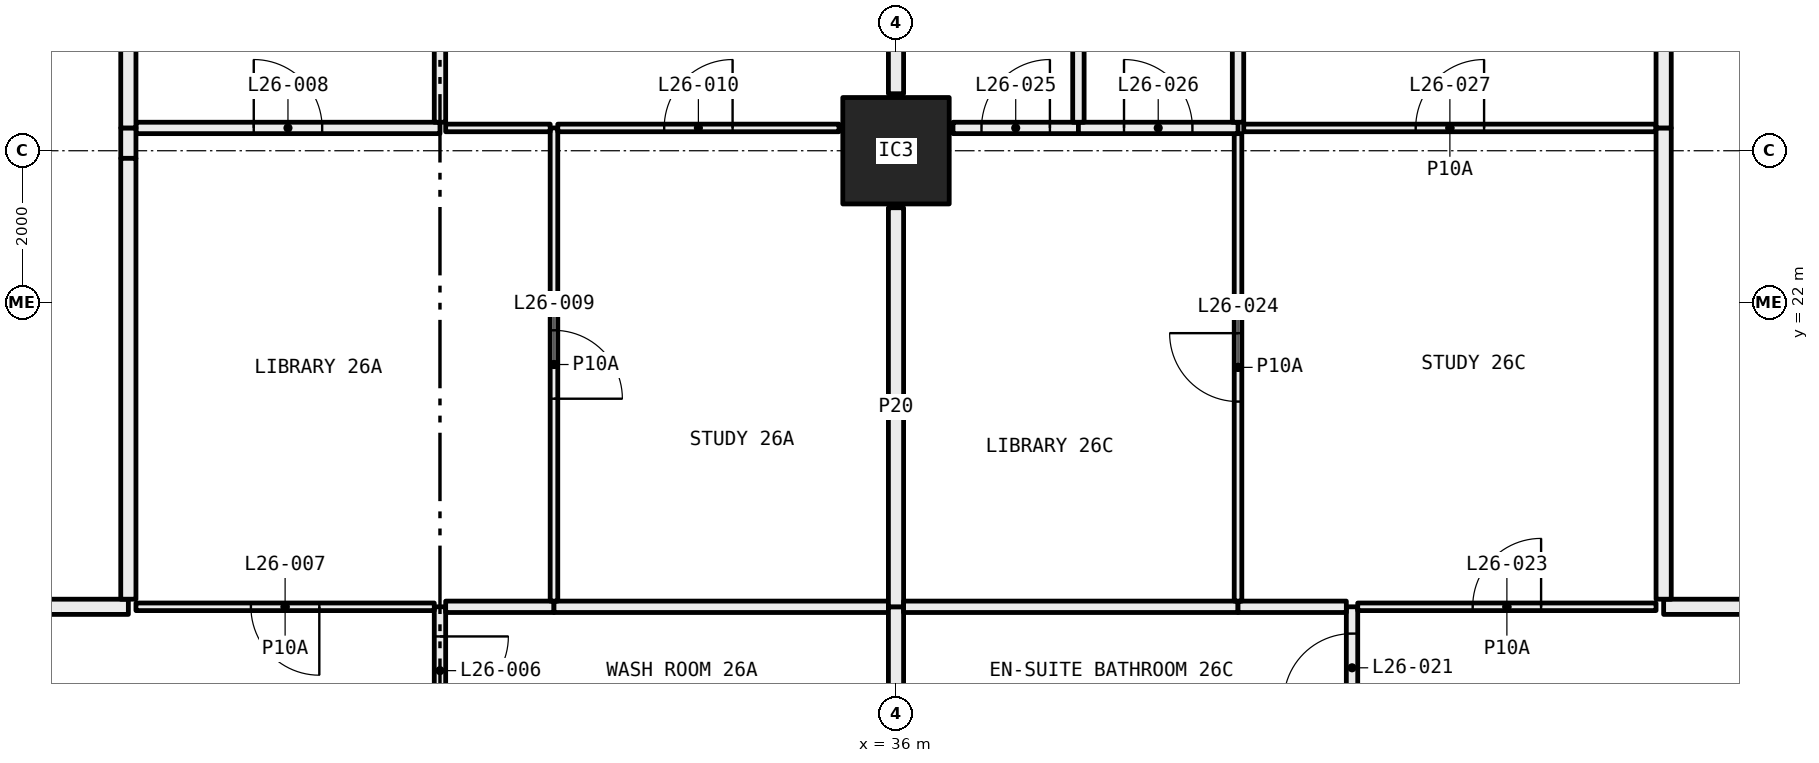
"""IFC4 building model, lengths in metres.
Left out: names, types, materials, properties, quantities, classifications, styles, units other than length and angle.
Written with IfcOpenShell. Run it as: python <this file> out.ifc"""

import sys

from ifc_helpers import new_model, si_unit, direction, frame, frame_2d, origin, origin_2d, place, context, subcontext, project, spatial, rectangle, hollow_rectangle, extrude, element, fill, save


model = new_model("IFC4")
c1 = context("Model", 3, precision=1e-05, world=origin(), true_north=direction((0.0, 1.0)))
c2 = subcontext(c1, "Body", "Model", "MODEL_VIEW")
j1 = project(units=[si_unit("LENGTHUNIT", "METRE"), si_unit("PLANEANGLEUNIT", "RADIAN")], contexts=[c1])
p1 = place(None, origin())
s1 = spatial("IfcSite", under=j1, at=p1, CompositionType="ELEMENT")
p2 = place(p1, origin())
s2 = spatial("IfcBuilding", under=s1, at=p2, CompositionType="ELEMENT")
p3 = place(p2, frame((0.0, 0.0, 103.5)))
s3 = spatial("IfcBuildingStorey", under=s2, at=p3, CompositionType="ELEMENT", Elevation=103.5)
p4 = place(p3, frame((36.0, 24.0, 0.0), z_axis=(0.0, 0.0, 1.0), x_axis=(1.0, 0.0, 0.0)))
e1 = element("IfcColumn", 1, at=p4, inside=s3, PredefinedType="COLUMN", context=c2, shape_type="SweptSolid", body=[
    extrude(hollow_rectangle(XDim=1.4, YDim=1.4, WallThickness=0.06, at=origin_2d()), origin(), (0.0, 0.0, 1.0), 3.05),
])
p5 = place(p3, frame((30.0, 16.32, 0.0), z_axis=(0.0, 0.0, 1.0), x_axis=(0.0, 1.0, 0.0)))
e2 = element("IfcWall", 2, at=p5, inside=s3, PredefinedType="PARTITIONING", context=c2, shape_type="SweptSolid", body=[
    extrude(rectangle(XDim=1.68, YDim=0.15, at=frame_2d((0.84, 0.0))), origin(), (0.0, 0.0, 1.0), 3.05),
])
p6 = place(p5, frame((0.39, 0.0, 0.0)))
e3 = element("IfcOpeningElement", 3, at=p6, cuts=e2, PredefinedType="OPENING", context=c2, shape_type="SweptSolid", body=[
    extrude(rectangle(XDim=0.9, YDim=2.1, at=frame_2d((0.45, 1.05))), frame((0.0, 0.085, 0.0), z_axis=(0.0, -1.0, 0.0), x_axis=(1.0, 0.0, 0.0)), (0.0, 0.0, 1.0), 0.17),
])
p7 = place(p3, frame((29.925, 18.0, 0.0), z_axis=(0.0, 0.0, 1.0), x_axis=(-1.0, 0.0, 0.0)))
e4 = element("IfcWall", 4, at=p7, inside=s3, PredefinedType="PARTITIONING", context=c2, shape_type="SweptSolid", body=[
    extrude(rectangle(XDim=3.925, YDim=0.1, at=frame_2d((1.962, 0.0))), origin(), (0.0, 0.0, 1.0), 3.05),
])
p8 = place(p7, frame((1.512, 0.0, 0.0)))
e5 = element("IfcOpeningElement", 5, at=p8, cuts=e4, PredefinedType="OPENING", context=c2, shape_type="SweptSolid", body=[
    extrude(rectangle(XDim=0.9, YDim=2.1, at=frame_2d((0.45, 1.05))), frame((0.0, 0.06, 0.0), z_axis=(0.0, -1.0, 0.0), x_axis=(1.0, 0.0, 0.0)), (0.0, 0.0, 1.0), 0.12),
])
p9 = place(p3, frame((25.9, 18.0, 0.0), z_axis=(0.0, 0.0, 1.0), x_axis=(-1.0, 0.0, 0.0)))
e6 = element("IfcWall", 6, at=p9, inside=s3, PredefinedType="PARTITIONING", context=c2, shape_type="SweptSolid", body=[
    extrude(rectangle(XDim=1.9, YDim=0.2, at=frame_2d((0.95, 0.0))), origin(), (0.0, 0.0, 1.0), 3.05),
])
p10 = place(p3, frame((31.5, 18.0, 0.0), z_axis=(0.0, 0.0, 1.0), x_axis=(-1.0, 0.0, 0.0)))
e7 = element("IfcWall", 7, at=p10, inside=s3, PredefinedType="PARTITIONING", context=c2, shape_type="SweptSolid", body=[
    extrude(rectangle(XDim=1.425, YDim=0.15, at=frame_2d((0.712, 0.0))), origin(), (0.0, 0.0, 1.0), 3.05),
])
p11 = place(p3, frame((35.9, 18.0, 0.0), z_axis=(0.0, 0.0, 1.0), x_axis=(-1.0, 0.0, 0.0)))
e8 = element("IfcWall", 8, at=p11, inside=s3, PredefinedType="PARTITIONING", context=c2, shape_type="SweptSolid", body=[
    extrude(rectangle(XDim=4.4, YDim=0.15, at=frame_2d((2.2, 0.0))), origin(), (0.0, 0.0, 1.0), 3.05),
])
p12 = place(p3, frame((36.0, 16.32, 0.0), z_axis=(0.0, 0.0, 1.0), x_axis=(0.0, 1.0, 0.0)))
e9 = element("IfcWall", 9, at=p12, inside=s3, PredefinedType="PARTITIONING", context=c2, shape_type="SweptSolid", body=[
    extrude(rectangle(XDim=1.68, YDim=0.2, at=frame_2d((0.84, 0.0))), origin(), (0.0, 0.0, 1.0), 2.45),
])
p13 = place(p3, frame((31.5, 18.075, 0.0), z_axis=(0.0, 0.0, 1.0), x_axis=(0.0, 1.0, 0.0)))
e10 = element("IfcWall", 10, at=p13, inside=s3, PredefinedType="PARTITIONING", context=c2, shape_type="SweptSolid", body=[
    extrude(rectangle(XDim=6.225, YDim=0.1, at=frame_2d((3.113, 0.0))), origin(), (0.0, 0.0, 1.0), 2.45),
])
p14 = place(p13, frame((2.663, 0.0, 0.0)))
e11 = element("IfcOpeningElement", 11, at=p14, cuts=e10, PredefinedType="OPENING", context=c2, shape_type="SweptSolid", body=[
    extrude(rectangle(XDim=0.9, YDim=2.1, at=frame_2d((0.45, 1.05))), frame((0.0, 0.06, 0.0), z_axis=(0.0, -1.0, 0.0), x_axis=(1.0, 0.0, 0.0)), (0.0, 0.0, 1.0), 0.12),
])
p15 = place(p3, frame((30.0, 24.3, 0.0), z_axis=(0.0, 0.0, 1.0), x_axis=(-1.0, 0.0, 0.0)))
e12 = element("IfcWall", 12, at=p15, inside=s3, PredefinedType="PARTITIONING", context=c2, shape_type="SweptSolid", body=[
    extrude(rectangle(XDim=4.0, YDim=0.15, at=frame_2d((2.0, 0.0))), origin(), (0.0, 0.0, 1.0), 3.05),
])
p16 = place(p15, frame((1.55, 0.0, 0.0)))
e13 = element("IfcOpeningElement", 13, at=p16, cuts=e12, PredefinedType="OPENING", context=c2, shape_type="SweptSolid", body=[
    extrude(rectangle(XDim=0.9, YDim=2.1, at=frame_2d((0.45, 1.05))), frame((0.0, 0.085, 0.0), z_axis=(0.0, -1.0, 0.0), x_axis=(1.0, 0.0, 0.0)), (0.0, 0.0, 1.0), 0.17),
])
p17 = place(p3, frame((31.45, 24.3, 0.0), z_axis=(0.0, 0.0, 1.0), x_axis=(-1.0, 0.0, 0.0)))
e14 = element("IfcWall", 14, at=p17, inside=s3, PredefinedType="PARTITIONING", context=c2, shape_type="SweptSolid", body=[
    extrude(rectangle(XDim=1.375, YDim=0.1, at=frame_2d((0.688, 0.0))), origin(), (0.0, 0.0, 1.0), 3.05),
])
p18 = place(p3, frame((25.9, 24.3, 0.0), z_axis=(0.0, 0.0, 1.0), x_axis=(0.0, -1.0, 0.0)))
e15 = element("IfcWall", 15, at=p18, inside=s3, PredefinedType="PARTITIONING", context=c2, shape_type="SweptSolid", body=[
    extrude(rectangle(XDim=0.4, YDim=0.2, at=frame_2d((0.2, 0.0))), origin(), (0.0, 0.0, 1.0), 2.45),
])
p19 = place(p3, frame((25.9, 23.9, 0.0), z_axis=(0.0, 0.0, 1.0), x_axis=(0.0, -1.0, 0.0)))
e16 = element("IfcWall", 16, at=p19, inside=s3, PredefinedType="PARTITIONING", context=c2, shape_type="SweptSolid", body=[
    extrude(rectangle(XDim=5.8, YDim=0.2, at=frame_2d((2.9, 0.0))), origin(), (0.0, 0.0, 1.0), 3.05),
])
p20 = place(p3, frame((35.25, 24.3, 0.0), z_axis=(0.0, 0.0, 1.0), x_axis=(-1.0, 0.0, 0.0)))
e17 = element("IfcWall", 17, at=p20, inside=s3, PredefinedType="PARTITIONING", context=c2, shape_type="SweptSolid", body=[
    extrude(rectangle(XDim=3.7, YDim=0.1, at=frame_2d((1.85, 0.0))), origin(), (0.0, 0.0, 1.0), 3.05),
])
p21 = place(p20, frame((1.4, 0.0, 0.0)))
e18 = element("IfcOpeningElement", 18, at=p21, cuts=e17, PredefinedType="OPENING", context=c2, shape_type="SweptSolid", body=[
    extrude(rectangle(XDim=0.9, YDim=2.1, at=frame_2d((0.45, 1.05))), frame((0.0, 0.06, 0.0), z_axis=(0.0, -1.0, 0.0), x_axis=(1.0, 0.0, 0.0)), (0.0, 0.0, 1.0), 0.12),
])
p22 = place(p3, frame((36.0, 18.0, 0.0), z_axis=(0.0, 0.0, 1.0), x_axis=(0.0, 1.0, 0.0)))
e19 = element("IfcWall", 19, at=p22, inside=s3, PredefinedType="PARTITIONING", context=c2, shape_type="SweptSolid", body=[
    extrude(rectangle(XDim=5.25, YDim=0.2, at=frame_2d((2.625, 0.0))), origin(), (0.0, 0.0, 1.0), 2.45),
])
p23 = place(p3, frame((30.0, 24.375, 0.0), z_axis=(0.0, 0.0, 1.0), x_axis=(0.0, 1.0, 0.0)))
e20 = element("IfcWall", 20, at=p23, inside=s3, PredefinedType="PARTITIONING", context=c2, shape_type="SweptSolid", body=[
    extrude(rectangle(XDim=4.325, YDim=0.15, at=frame_2d((2.163, 0.0))), origin(), (0.0, 0.0, 1.0), 3.05),
])
p24 = place(p3, frame((25.9, 28.7, 0.0), z_axis=(0.0, 0.0, 1.0), x_axis=(0.0, -1.0, 0.0)))
e21 = element("IfcWall", 21, at=p24, inside=s3, PredefinedType="PARTITIONING", context=c2, shape_type="SweptSolid", body=[
    extrude(rectangle(XDim=4.4, YDim=0.2, at=frame_2d((2.2, 0.0))), origin(), (0.0, 0.0, 1.0), 3.05),
])
p25 = place(p3, frame((36.0, 24.75, 0.0), z_axis=(0.0, 0.0, 1.0), x_axis=(0.0, 1.0, 0.0)))
e22 = element("IfcWall", 22, at=p25, inside=s3, PredefinedType="PARTITIONING", context=c2, shape_type="SweptSolid", body=[
    extrude(rectangle(XDim=1.8, YDim=0.2, at=frame_2d((0.9, 0.0))), origin(), (0.0, 0.0, 1.0), 2.45),
])
p26 = place(p3, frame((42.0, 16.395, 0.0), z_axis=(0.0, 0.0, 1.0), x_axis=(0.0, 1.0, 0.0)))
e23 = element("IfcWall", 23, at=p26, inside=s3, PredefinedType="PARTITIONING", context=c2, shape_type="SweptSolid", body=[
    extrude(rectangle(XDim=1.605, YDim=0.15, at=frame_2d((0.802, 0.0))), origin(), (0.0, 0.0, 1.0), 3.05),
])
p27 = place(p26, frame((0.353, 0.0, 0.0)))
e24 = element("IfcOpeningElement", 24, at=p27, cuts=e23, PredefinedType="OPENING", context=c2, shape_type="SweptSolid", body=[
    extrude(rectangle(XDim=0.9, YDim=2.1, at=frame_2d((0.45, 1.05))), frame((0.0, 0.085, 0.0), z_axis=(0.0, -1.0, 0.0), x_axis=(1.0, 0.0, 0.0)), (0.0, 0.0, 1.0), 0.17),
])
p28 = place(p3, frame((40.5, 18.0, 0.0), z_axis=(0.0, 0.0, 1.0), x_axis=(-1.0, 0.0, 0.0)))
e25 = element("IfcWall", 25, at=p28, inside=s3, PredefinedType="PARTITIONING", context=c2, shape_type="SweptSolid", body=[
    extrude(rectangle(XDim=4.4, YDim=0.15, at=frame_2d((2.2, 0.0))), origin(), (0.0, 0.0, 1.0), 3.05),
])
p29 = place(p3, frame((41.925, 18.0, 0.0), z_axis=(0.0, 0.0, 1.0), x_axis=(-1.0, 0.0, 0.0)))
e26 = element("IfcWall", 26, at=p29, inside=s3, PredefinedType="PARTITIONING", context=c2, shape_type="SweptSolid", body=[
    extrude(rectangle(XDim=1.425, YDim=0.15, at=frame_2d((0.712, 0.0))), origin(), (0.0, 0.0, 1.0), 3.05),
])
p30 = place(p3, frame((46.0, 18.0, 0.0), z_axis=(0.0, 0.0, 1.0), x_axis=(-1.0, 0.0, 0.0)))
e27 = element("IfcWall", 27, at=p30, inside=s3, PredefinedType="PARTITIONING", context=c2, shape_type="SweptSolid", body=[
    extrude(rectangle(XDim=3.925, YDim=0.1, at=frame_2d((1.962, 0.0))), origin(), (0.0, 0.0, 1.0), 3.05),
])
p31 = place(p30, frame((1.512, 0.0, 0.0)))
e28 = element("IfcOpeningElement", 28, at=p31, cuts=e27, PredefinedType="OPENING", context=c2, shape_type="SweptSolid", body=[
    extrude(rectangle(XDim=0.9, YDim=2.1, at=frame_2d((0.45, 1.05))), frame((0.0, 0.06, 0.0), z_axis=(0.0, -1.0, 0.0), x_axis=(1.0, 0.0, 0.0)), (0.0, 0.0, 1.0), 0.12),
])
p32 = place(p3, frame((54.0, 18.0, 0.0), z_axis=(0.0, 0.0, 1.0), x_axis=(-1.0, 0.0, 0.0)))
e29 = element("IfcWall", 29, at=p32, inside=s3, PredefinedType="PARTITIONING", context=c2, shape_type="SweptSolid", body=[
    extrude(rectangle(XDim=7.9, YDim=0.2, at=frame_2d((3.95, 0.0))), origin(), (0.0, 0.0, 1.0), 3.05),
])
p33 = place(p3, frame((40.5, 18.075, 0.0), z_axis=(0.0, 0.0, 1.0), x_axis=(0.0, 1.0, 0.0)))
e30 = element("IfcWall", 30, at=p33, inside=s3, PredefinedType="PARTITIONING", context=c2, shape_type="SweptSolid", body=[
    extrude(rectangle(XDim=6.15, YDim=0.1, at=frame_2d((3.075, 0.0))), origin(), (0.0, 0.0, 1.0), 2.45),
])
p34 = place(p33, frame((2.625, 0.0, 0.0)))
e31 = element("IfcOpeningElement", 31, at=p34, cuts=e30, PredefinedType="OPENING", context=c2, shape_type="SweptSolid", body=[
    extrude(rectangle(XDim=0.9, YDim=2.1, at=frame_2d((0.45, 1.05))), frame((0.0, 0.06, 0.0), z_axis=(0.0, -1.0, 0.0), x_axis=(1.0, 0.0, 0.0)), (0.0, 0.0, 1.0), 0.12),
])
p35 = place(p3, frame((38.4, 24.3, 0.0), z_axis=(0.0, 0.0, 1.0), x_axis=(-1.0, 0.0, 0.0)))
e32 = element("IfcWall", 32, at=p35, inside=s3, PredefinedType="PARTITIONING", context=c2, shape_type="SweptSolid", body=[
    extrude(rectangle(XDim=1.65, YDim=0.15, at=frame_2d((0.825, 0.0))), origin(), (0.0, 0.0, 1.0), 3.05),
])
p36 = place(p35, frame((0.375, 0.0, 0.0)))
e33 = element("IfcOpeningElement", 33, at=p36, cuts=e32, PredefinedType="OPENING", context=c2, shape_type="SweptSolid", body=[
    extrude(rectangle(XDim=0.9, YDim=2.1, at=frame_2d((0.45, 1.05))), frame((0.0, 0.085, 0.0), z_axis=(0.0, -1.0, 0.0), x_axis=(1.0, 0.0, 0.0)), (0.0, 0.0, 1.0), 0.17),
])
p37 = place(p3, frame((40.5, 24.3, 0.0), z_axis=(0.0, 0.0, 1.0), x_axis=(-1.0, 0.0, 0.0)))
e34 = element("IfcWall", 34, at=p37, inside=s3, PredefinedType="PARTITIONING", context=c2, shape_type="SweptSolid", body=[
    extrude(rectangle(XDim=2.1, YDim=0.15, at=frame_2d((1.05, 0.0))), origin(), (0.0, 0.0, 1.0), 3.05),
])
p38 = place(p37, frame((0.6, 0.0, 0.0)))
e35 = element("IfcOpeningElement", 35, at=p38, cuts=e34, PredefinedType="OPENING", context=c2, shape_type="SweptSolid", body=[
    extrude(rectangle(XDim=0.9, YDim=2.1, at=frame_2d((0.45, 1.05))), frame((0.0, 0.085, 0.0), z_axis=(0.0, -1.0, 0.0), x_axis=(1.0, 0.0, 0.0)), (0.0, 0.0, 1.0), 0.17),
])
p39 = place(p3, frame((46.0, 24.3, 0.0), z_axis=(0.0, 0.0, 1.0), x_axis=(-1.0, 0.0, 0.0)))
e36 = element("IfcWall", 36, at=p39, inside=s3, PredefinedType="PARTITIONING", context=c2, shape_type="SweptSolid", body=[
    extrude(rectangle(XDim=5.425, YDim=0.1, at=frame_2d((2.712, 0.0))), origin(), (0.0, 0.0, 1.0), 3.05),
])
p40 = place(p39, frame((2.262, 0.0, 0.0)))
e37 = element("IfcOpeningElement", 37, at=p40, cuts=e36, PredefinedType="OPENING", context=c2, shape_type="SweptSolid", body=[
    extrude(rectangle(XDim=0.9, YDim=2.1, at=frame_2d((0.45, 1.05))), frame((0.0, 0.06, 0.0), z_axis=(0.0, -1.0, 0.0), x_axis=(1.0, 0.0, 0.0)), (0.0, 0.0, 1.0), 0.12),
])
p41 = place(p3, frame((46.1, 18.1, 0.0), z_axis=(0.0, 0.0, 1.0), x_axis=(0.0, 1.0, 0.0)))
e38 = element("IfcWall", 38, at=p41, inside=s3, PredefinedType="PARTITIONING", context=c2, shape_type="SweptSolid", body=[
    extrude(rectangle(XDim=6.2, YDim=0.2, at=frame_2d((3.1, 0.0))), origin(), (0.0, 0.0, 1.0), 2.45),
])
p42 = place(p3, frame((38.4, 24.375, 0.0), z_axis=(0.0, 0.0, 1.0), x_axis=(0.0, 1.0, 0.0)))
e39 = element("IfcWall", 39, at=p42, inside=s3, PredefinedType="PARTITIONING", context=c2, shape_type="SweptSolid", body=[
    extrude(rectangle(XDim=2.1, YDim=0.15, at=frame_2d((1.05, 0.0))), origin(), (0.0, 0.0, 1.0), 3.05),
])
p43 = place(p3, frame((40.5, 24.375, 0.0), z_axis=(0.0, 0.0, 1.0), x_axis=(0.0, 1.0, 0.0)))
e40 = element("IfcWall", 40, at=p43, inside=s3, PredefinedType="PARTITIONING", context=c2, shape_type="SweptSolid", body=[
    extrude(rectangle(XDim=4.325, YDim=0.15, at=frame_2d((2.163, 0.0))), origin(), (0.0, 0.0, 1.0), 3.05),
])
p44 = place(p3, frame((46.1, 24.3, 0.0), z_axis=(0.0, 0.0, 1.0), x_axis=(0.0, 1.0, 0.0)))
e41 = element("IfcWall", 41, at=p44, inside=s3, PredefinedType="PARTITIONING", context=c2, shape_type="SweptSolid", body=[
    extrude(rectangle(XDim=4.5, YDim=0.2, at=frame_2d((2.25, 0.0))), origin(), (0.0, 0.0, 1.0), 3.05),
])
p45 = place(p6, frame((0.9, 0.0, 0.0), x_axis=(-1.0, 0.0, 0.0)))
e42 = element("IfcDoor", 42, at=p45, inside=s3, OperationType="SINGLE_SWING_RIGHT", PredefinedType="DOOR", context=c2, shape_type="SweptSolid", body=[
    extrude(rectangle(XDim=0.9, YDim=2.1, at=frame_2d((0.45, 1.05))), frame((0.0, 0.025, 0.0), z_axis=(0.0, -1.0, 0.0), x_axis=(1.0, 0.0, 0.0)), (0.0, 0.0, 1.0), 0.05),
])
fill(e3, e42)
p46 = place(p8, origin())
e43 = element("IfcDoor", 43, at=p46, inside=s3, OperationType="SINGLE_SWING_RIGHT", PredefinedType="DOOR", context=c2, shape_type="SweptSolid", body=[
    extrude(rectangle(XDim=0.9, YDim=2.1, at=frame_2d((0.45, 1.05))), frame((0.0, 0.025, 0.0), z_axis=(0.0, -1.0, 0.0), x_axis=(1.0, 0.0, 0.0)), (0.0, 0.0, 1.0), 0.05),
])
fill(e5, e43)
p47 = place(p16, frame((0.9, 0.0, 0.0), x_axis=(-1.0, 0.0, 0.0)))
e44 = element("IfcDoor", 44, at=p47, inside=s3, OperationType="SINGLE_SWING_RIGHT", PredefinedType="DOOR", context=c2, shape_type="SweptSolid", body=[
    extrude(rectangle(XDim=0.9, YDim=2.1, at=frame_2d((0.45, 1.05))), frame((0.0, 0.025, 0.0), z_axis=(0.0, -1.0, 0.0), x_axis=(1.0, 0.0, 0.0)), (0.0, 0.0, 1.0), 0.05),
])
fill(e13, e44)
p48 = place(p14, frame((0.9, 0.0, 0.0), x_axis=(-1.0, 0.0, 0.0)))
e45 = element("IfcDoor", 45, at=p48, inside=s3, OperationType="SINGLE_SWING_LEFT", PredefinedType="DOOR", context=c2, shape_type="SweptSolid", body=[
    extrude(rectangle(XDim=0.9, YDim=2.1, at=frame_2d((0.45, 1.05))), frame((0.0, 0.025, 0.0), z_axis=(0.0, -1.0, 0.0), x_axis=(1.0, 0.0, 0.0)), (0.0, 0.0, 1.0), 0.05),
])
fill(e11, e45)
p49 = place(p21, frame((0.9, 0.0, 0.0), x_axis=(-1.0, 0.0, 0.0)))
e46 = element("IfcDoor", 46, at=p49, inside=s3, OperationType="SINGLE_SWING_LEFT", PredefinedType="DOOR", context=c2, shape_type="SweptSolid", body=[
    extrude(rectangle(XDim=0.9, YDim=2.1, at=frame_2d((0.45, 1.05))), frame((0.0, 0.025, 0.0), z_axis=(0.0, -1.0, 0.0), x_axis=(1.0, 0.0, 0.0)), (0.0, 0.0, 1.0), 0.05),
])
fill(e18, e46)
p50 = place(p27, origin())
e47 = element("IfcDoor", 47, at=p50, inside=s3, OperationType="SINGLE_SWING_RIGHT", PredefinedType="DOOR", context=c2, shape_type="SweptSolid", body=[
    extrude(rectangle(XDim=0.9, YDim=2.1, at=frame_2d((0.45, 1.05))), frame((0.0, 0.025, 0.0), z_axis=(0.0, -1.0, 0.0), x_axis=(1.0, 0.0, 0.0)), (0.0, 0.0, 1.0), 0.05),
])
fill(e24, e47)
p51 = place(p31, frame((0.9, 0.0, 0.0), x_axis=(-1.0, 0.0, 0.0)))
e48 = element("IfcDoor", 48, at=p51, inside=s3, OperationType="SINGLE_SWING_LEFT", PredefinedType="DOOR", context=c2, shape_type="SweptSolid", body=[
    extrude(rectangle(XDim=0.9, YDim=2.1, at=frame_2d((0.45, 1.05))), frame((0.0, 0.025, 0.0), z_axis=(0.0, -1.0, 0.0), x_axis=(1.0, 0.0, 0.0)), (0.0, 0.0, 1.0), 0.05),
])
fill(e28, e48)
p52 = place(p34, origin())
e49 = element("IfcDoor", 49, at=p52, inside=s3, OperationType="SINGLE_SWING_LEFT", PredefinedType="DOOR", context=c2, shape_type="SweptSolid", body=[
    extrude(rectangle(XDim=0.9, YDim=2.1, at=frame_2d((0.45, 1.05))), frame((0.0, 0.025, 0.0), z_axis=(0.0, -1.0, 0.0), x_axis=(1.0, 0.0, 0.0)), (0.0, 0.0, 1.0), 0.05),
])
fill(e31, e49)
p53 = place(p36, frame((0.9, 0.0, 0.0), x_axis=(-1.0, 0.0, 0.0)))
e50 = element("IfcDoor", 50, at=p53, inside=s3, OperationType="SINGLE_SWING_LEFT", PredefinedType="DOOR", context=c2, shape_type="SweptSolid", body=[
    extrude(rectangle(XDim=0.9, YDim=2.1, at=frame_2d((0.45, 1.05))), frame((0.0, 0.025, 0.0), z_axis=(0.0, -1.0, 0.0), x_axis=(1.0, 0.0, 0.0)), (0.0, 0.0, 1.0), 0.05),
])
fill(e33, e50)
p54 = place(p38, frame((0.9, 0.0, 0.0), x_axis=(-1.0, 0.0, 0.0)))
e51 = element("IfcDoor", 51, at=p54, inside=s3, OperationType="SINGLE_SWING_RIGHT", PredefinedType="DOOR", context=c2, shape_type="SweptSolid", body=[
    extrude(rectangle(XDim=0.9, YDim=2.1, at=frame_2d((0.45, 1.05))), frame((0.0, 0.025, 0.0), z_axis=(0.0, -1.0, 0.0), x_axis=(1.0, 0.0, 0.0)), (0.0, 0.0, 1.0), 0.05),
])
fill(e35, e51)
p55 = place(p40, frame((0.9, 0.0, 0.0), x_axis=(-1.0, 0.0, 0.0)))
e52 = element("IfcDoor", 52, at=p55, inside=s3, OperationType="SINGLE_SWING_LEFT", PredefinedType="DOOR", context=c2, shape_type="SweptSolid", body=[
    extrude(rectangle(XDim=0.9, YDim=2.1, at=frame_2d((0.45, 1.05))), frame((0.0, 0.025, 0.0), z_axis=(0.0, -1.0, 0.0), x_axis=(1.0, 0.0, 0.0)), (0.0, 0.0, 1.0), 0.05),
])
fill(e37, e52)
save(model, sys.argv[1])
